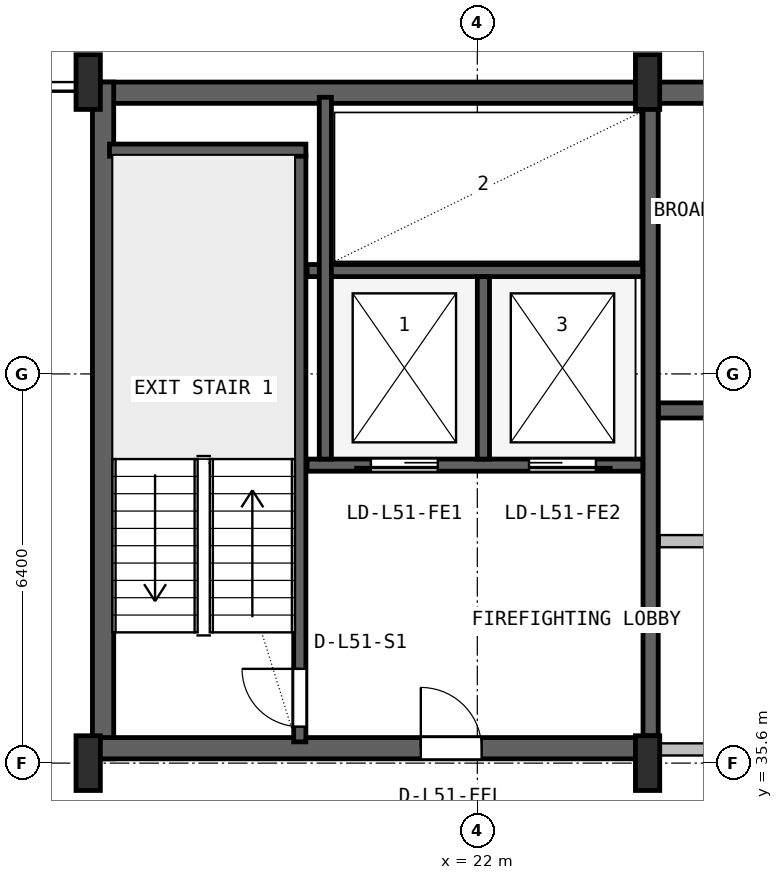
"""IFC4 building model, lengths in metres.
Left out: names, types, materials, properties, quantities, classifications, styles, units other than length and angle.
Written with IfcOpenShell. Run it as: python <this file> out.ifc"""

import sys

from ifc_helpers import new_model, si_unit, direction, frame, frame_2d, origin, origin_2d, place, context, subcontext, project, spatial, rectangle, i_section, extrude, source, transform, mapped, element, fill, save


model = new_model("IFC4")
c1 = context("Model", 3, precision=1e-05, world=origin(), true_north=direction((0.0, 1.0)))
c2 = subcontext(c1, "Body", "Model", "MODEL_VIEW")
j1 = project(units=[si_unit("LENGTHUNIT", "METRE"), si_unit("PLANEANGLEUNIT", "RADIAN")], contexts=[c1])
p1 = place(None, origin())
s1 = spatial("IfcSite", under=j1, at=p1, CompositionType="ELEMENT")
p2 = place(p1, origin())
s2 = spatial("IfcBuilding", under=s1, at=p2, CompositionType="ELEMENT")
p3 = place(p2, frame((0.0, 0.0, 207.4)))
s3 = spatial("IfcBuildingStorey", under=s2, at=p3, CompositionType="ELEMENT", Elevation=207.4)
p4 = place(p3, frame((15.6, 46.625, 0.0), z_axis=(0.0, 0.0, 1.0), x_axis=(1.0, 0.0, 0.0)))
e1 = element("IfcWall", 1, at=p4, inside=s3, PredefinedType="SHEAR", context=c2, shape_type="SweptSolid", body=[
    extrude(rectangle(XDim=36.8, YDim=0.35, at=frame_2d((18.4, 0.0))), origin(), (0.0, 0.0, 1.0), 3.55),
])
p5 = place(p3, frame((15.845, 35.67, 0.0), z_axis=(0.0, 0.0, 1.0), x_axis=(0.0, 1.0, 0.0)))
e2 = element("IfcWall", 2, at=p5, inside=s3, PredefinedType="SHEAR", context=c2, shape_type="SweptSolid", body=[
    extrude(rectangle(XDim=11.13, YDim=0.35, at=frame_2d((5.565, 0.0))), origin(), (0.0, 0.0, 1.0), 3.55),
])
p6 = place(p3, frame((15.67, 35.845, 0.0), z_axis=(0.0, 0.0, 1.0), x_axis=(1.0, 0.0, 0.0)))
e3 = element("IfcWall", 3, at=p6, inside=s3, PredefinedType="SHEAR", context=c2, shape_type="SweptSolid", body=[
    extrude(rectangle(XDim=9.13, YDim=0.35, at=frame_2d((4.565, 0.0))), origin(), (0.0, 0.0, 1.0), 3.55),
])
p7 = place(p6, frame((5.4, 0.0, 0.0)))
e4 = element("IfcOpeningElement", 4, at=p7, cuts=e3, PredefinedType="OPENING", context=c2, shape_type="SweptSolid", body=[
    extrude(rectangle(XDim=1.0, YDim=2.1, at=frame_2d((0.5, 1.05))), frame((0.0, 0.185, 0.0), z_axis=(0.0, -1.0, 0.0), x_axis=(1.0, 0.0, 0.0)), (0.0, 0.0, 1.0), 0.37),
])
m1 = source(origin(), c2, "Body", "SweptSolid", [
    extrude(i_section(OverallWidth=0.4, OverallDepth=0.9, WebThickness=0.016, FlangeThickness=0.028, FilletRadius=0.016, at=origin_2d()), origin(), (0.0, 0.0, 1.0), 3.8),
])
for number, where, z_axis, x_axis in (
    (5, (15.6, 35.6, 0.0), (0.0, 0.0, 1.0), (1.0, 0.0, 0.0)),
    (6, (15.6, 46.8, 0.0), (0.0, 0.0, 1.0), (1.0, 0.0, 0.0)),
    (7, (24.8, 35.6, 0.0), (0.0, 0.0, 1.0), (1.0, 0.0, 0.0)),
    (8, (24.8, 46.8, 0.0), (0.0, 0.0, 1.0), (1.0, 0.0, 0.0)),
):
    element("IfcColumn", number, at=place(p3, frame(where, z_axis=z_axis, x_axis=x_axis)), inside=s3, PredefinedType="COLUMN", context=c2, shape_type="MappedRepresentation", body=[
        mapped(m1, transform((0.0, 0.0, 0.0), x_axis=(1.0, 0.0, 0.0), y_axis=(0.0, 1.0, 0.0), z_axis=(0.0, 0.0, 1.0), scale=1.0)),
    ])
p8 = place(p3, frame((19.08, 35.95, 0.0), z_axis=(0.0, 0.0, 1.0), x_axis=(0.0, 1.0, 0.0)))
e9 = element("IfcWall", 9, at=p8, inside=s3, PredefinedType="SHEAR", context=c2, shape_type="SweptSolid", body=[
    extrude(rectangle(XDim=9.65, YDim=0.2, at=frame_2d((4.825, 0.0))), origin(), (0.0, 0.0, 1.0), 3.55),
])
p9 = place(p8, frame((0.25, 0.0, 0.0)))
e10 = element("IfcOpeningElement", 10, at=p9, cuts=e9, PredefinedType="OPENING", context=c2, shape_type="SweptSolid", body=[
    extrude(rectangle(XDim=0.95, YDim=2.1, at=frame_2d((0.475, 1.05))), frame((0.0, 0.11, 0.0), z_axis=(0.0, -1.0, 0.0), x_axis=(1.0, 0.0, 0.0)), (0.0, 0.0, 1.0), 0.22),
])
p10 = place(p3, frame((15.95, 45.68, 0.0), z_axis=(0.0, 0.0, 1.0), x_axis=(1.0, 0.0, 0.0)))
e11 = element("IfcWall", 11, at=p10, inside=s3, PredefinedType="SHEAR", context=c2, shape_type="SweptSolid", body=[
    extrude(rectangle(XDim=3.23, YDim=0.2, at=frame_2d((1.615, 0.0))), origin(), (0.0, 0.0, 1.0), 3.55),
])
p11 = place(p3, frame((24.85, 36.05, 0.0), z_axis=(0.0, 0.0, 1.0), x_axis=(0.0, 1.0, 0.0)))
e12 = element("IfcWall", 12, at=p11, inside=s3, PredefinedType="SHEAR", context=c2, shape_type="SweptSolid", body=[
    extrude(rectangle(XDim=10.45, YDim=0.25, at=frame_2d((5.225, 0.0))), origin(), (0.0, 0.0, 1.0), 3.55),
])
p12 = place(p3, frame((19.2, 40.5, 0.0), z_axis=(0.0, 0.0, 1.0), x_axis=(1.0, 0.0, 0.0)))
e13 = element("IfcWall", 13, at=p12, inside=s3, PredefinedType="SHEAR", context=c2, shape_type="SweptSolid", body=[
    extrude(rectangle(XDim=5.52, YDim=0.2, at=frame_2d((2.76, 0.0))), origin(), (0.0, 0.0, 1.0), 3.55),
])
p13 = place(p12, frame((1.05, 0.0, 0.0)))
e14 = element("IfcOpeningElement", 14, at=p13, cuts=e13, PredefinedType="OPENING", context=c2, shape_type="SweptSolid", body=[
    extrude(rectangle(XDim=1.1, YDim=2.18, at=frame_2d((0.55, 1.09))), frame((0.0, 0.11, 0.0), z_axis=(0.0, -1.0, 0.0), x_axis=(1.0, 0.0, 0.0)), (0.0, 0.0, 1.0), 0.22),
])
p14 = place(p12, frame((3.65, 0.0, 0.0)))
e15 = element("IfcOpeningElement", 15, at=p14, cuts=e13, PredefinedType="OPENING", context=c2, shape_type="SweptSolid", body=[
    extrude(rectangle(XDim=1.1, YDim=2.18, at=frame_2d((0.55, 1.09))), frame((0.0, 0.11, 0.0), z_axis=(0.0, -1.0, 0.0), x_axis=(1.0, 0.0, 0.0)), (0.0, 0.0, 1.0), 0.22),
])
p15 = place(p3, frame((19.2, 43.7, 0.0), z_axis=(0.0, 0.0, 1.0), x_axis=(1.0, 0.0, 0.0)))
e16 = element("IfcWall", 16, at=p15, inside=s3, PredefinedType="SHEAR", context=c2, shape_type="SweptSolid", body=[
    extrude(rectangle(XDim=5.52, YDim=0.2, at=frame_2d((2.76, 0.0))), origin(), (0.0, 0.0, 1.0), 3.55),
])
p16 = place(p3, frame((22.1, 40.6, 0.0), z_axis=(0.0, 0.0, 1.0), x_axis=(0.0, 1.0, 0.0)))
e17 = element("IfcWall", 17, at=p16, inside=s3, PredefinedType="SHEAR", context=c2, shape_type="SweptSolid", body=[
    extrude(rectangle(XDim=3.0, YDim=0.2, at=frame_2d((1.5, 0.0))), origin(), (0.0, 0.0, 1.0), 3.55),
])
p17 = place(p3, frame((19.5, 40.6, 0.0), z_axis=(0.0, 0.0, 1.0), x_axis=(0.0, 1.0, 0.0)))
e18 = element("IfcWall", 18, at=p17, inside=s3, PredefinedType="SHEAR", context=c2, shape_type="SweptSolid", body=[
    extrude(rectangle(XDim=5.95, YDim=0.2, at=frame_2d((2.975, 0.0))), origin(), (0.0, 0.0, 1.0), 3.55),
])
p18 = place(p3, frame((24.98, 41.4, 0.0), z_axis=(0.0, 0.0, 1.0), x_axis=(1.0, 0.0, 0.0)))
e19 = element("IfcWall", 19, at=p18, inside=s3, PredefinedType="SHEAR", context=c2, shape_type="SweptSolid", body=[
    extrude(rectangle(XDim=23.82, YDim=0.25, at=frame_2d((11.91, 0.0))), origin(), (0.0, 0.0, 1.0), 3.55),
])
p19 = place(p18, frame((16.87, 0.0, 0.0)))
e20 = element("IfcOpeningElement", 20, at=p19, cuts=e19, PredefinedType="OPENING", context=c2, shape_type="SweptSolid", body=[
    extrude(rectangle(XDim=1.1, YDim=2.18, at=frame_2d((0.55, 1.09))), frame((0.0, 0.135, 0.0), z_axis=(0.0, -1.0, 0.0), x_axis=(1.0, 0.0, 0.0)), (0.0, 0.0, 1.0), 0.27),
])
p20 = place(p18, frame((19.47, 0.0, 0.0)))
e21 = element("IfcOpeningElement", 21, at=p20, cuts=e19, PredefinedType="OPENING", context=c2, shape_type="SweptSolid", body=[
    extrude(rectangle(XDim=1.1, YDim=2.18, at=frame_2d((0.55, 1.09))), frame((0.0, 0.135, 0.0), z_axis=(0.0, -1.0, 0.0), x_axis=(1.0, 0.0, 0.0)), (0.0, 0.0, 1.0), 0.27),
])
p21 = place(p18, frame((22.07, 0.0, 0.0)))
e22 = element("IfcOpeningElement", 22, at=p21, cuts=e19, PredefinedType="OPENING", context=c2, shape_type="SweptSolid", body=[
    extrude(rectangle(XDim=1.1, YDim=2.18, at=frame_2d((0.55, 1.09))), frame((0.0, 0.135, 0.0), z_axis=(0.0, -1.0, 0.0), x_axis=(1.0, 0.0, 0.0)), (0.0, 0.0, 1.0), 0.27),
])
p22 = place(p18, frame((3.56, 0.0, 0.0)))
e23 = element("IfcOpeningElement", 23, at=p22, cuts=e19, PredefinedType="OPENING", context=c2, shape_type="SweptSolid", body=[
    extrude(rectangle(XDim=1.0, YDim=2.08, at=frame_2d((0.5, 1.04))), frame((0.0, 0.135, 0.0), z_axis=(0.0, -1.0, 0.0), x_axis=(1.0, 0.0, 0.0)), (0.0, 0.0, 1.0), 0.27),
])
p23 = place(p18, frame((9.76, 0.0, 0.0)))
e24 = element("IfcOpeningElement", 24, at=p23, cuts=e19, PredefinedType="OPENING", context=c2, shape_type="SweptSolid", body=[
    extrude(rectangle(XDim=0.92, YDim=2.08, at=frame_2d((0.46, 1.04))), frame((0.0, 0.135, 0.0), z_axis=(0.0, -1.0, 0.0), x_axis=(1.0, 0.0, 0.0)), (0.0, 0.0, 1.0), 0.27),
])
p24 = place(p18, frame((13.66, 0.0, 0.0)))
e25 = element("IfcOpeningElement", 25, at=p24, cuts=e19, PredefinedType="OPENING", context=c2, shape_type="SweptSolid", body=[
    extrude(rectangle(XDim=0.92, YDim=2.08, at=frame_2d((0.46, 1.04))), frame((0.0, 0.135, 0.0), z_axis=(0.0, -1.0, 0.0), x_axis=(1.0, 0.0, 0.0)), (0.0, 0.0, 1.0), 0.27),
])
p25 = place(p3, frame((25.0, 35.825, 0.0), z_axis=(0.0, 0.0, 1.0), x_axis=(1.0, 0.0, 0.0)))
e26 = element("IfcWall", 26, at=p25, inside=s3, PredefinedType="PLUMBINGWALL", context=c2, shape_type="SweptSolid", body=[
    extrude(rectangle(XDim=9.75, YDim=0.2, at=frame_2d((4.875, 0.0))), origin(), (0.0, 0.0, 1.0), 2.575),
])
p26 = place(p3, frame((25.0, 39.25, 0.0), z_axis=(0.0, 0.0, 1.0), x_axis=(1.0, 0.0, 0.0)))
e27 = element("IfcWall", 27, at=p26, inside=s3, PredefinedType="PLUMBINGWALL", context=c2, shape_type="SweptSolid", body=[
    extrude(rectangle(XDim=9.75, YDim=0.2, at=frame_2d((4.875, 0.0))), origin(), (0.0, 0.0, 1.0), 3.53),
])
p27 = place(p26, frame((1.75, 0.0, 0.0)))
e28 = element("IfcOpeningElement", 28, at=p27, cuts=e27, PredefinedType="OPENING", context=c2, shape_type="SweptSolid", body=[
    extrude(rectangle(XDim=0.9, YDim=2.06, at=frame_2d((0.45, 1.03))), frame((0.0, 0.11, 0.0), z_axis=(0.0, -1.0, 0.0), x_axis=(1.0, 0.0, 0.0)), (0.0, 0.0, 1.0), 0.22),
])
p28 = place(p26, frame((6.725, 0.0, 0.0)))
e29 = element("IfcOpeningElement", 29, at=p28, cuts=e27, PredefinedType="OPENING", context=c2, shape_type="SweptSolid", body=[
    extrude(rectangle(XDim=0.9, YDim=2.06, at=frame_2d((0.45, 1.03))), frame((0.0, 0.11, 0.0), z_axis=(0.0, -1.0, 0.0), x_axis=(1.0, 0.0, 0.0)), (0.0, 0.0, 1.0), 0.22),
])
m2 = source(origin(), c2, "Body", "SweptSolid", [
    extrude(rectangle(XDim=0.95, YDim=2.1, at=frame_2d((0.475, 1.05))), frame((0.0, 0.025, 0.0), z_axis=(0.0, -1.0, 0.0), x_axis=(1.0, 0.0, 0.0)), (0.0, 0.0, 1.0), 0.05),
])
p29 = place(p9, origin())
e30 = element("IfcDoor", 30, at=p29, inside=s3, OperationType="SINGLE_SWING_RIGHT", PredefinedType="DOOR", context=c2, shape_type="MappedRepresentation", body=[
    mapped(m2, transform((0.0, 0.0, 0.0), x_axis=(1.0, 0.0, 0.0), y_axis=(0.0, 1.0, 0.0), z_axis=(0.0, 0.0, 1.0), scale=1.0)),
])
fill(e10, e30)
m3 = source(origin(), c2, "Body", "SweptSolid", [
    extrude(rectangle(XDim=1.0, YDim=2.1, at=frame_2d((0.5, 1.05))), frame((0.0, 0.025, 0.0), z_axis=(0.0, -1.0, 0.0), x_axis=(1.0, 0.0, 0.0)), (0.0, 0.0, 1.0), 0.05),
])
p30 = place(p7, origin())
e31 = element("IfcDoor", 31, at=p30, inside=s3, OperationType="SINGLE_SWING_LEFT", PredefinedType="DOOR", context=c2, shape_type="MappedRepresentation", body=[
    mapped(m3, transform((0.0, 0.0, 0.0), x_axis=(1.0, 0.0, 0.0), y_axis=(0.0, 1.0, 0.0), z_axis=(0.0, 0.0, 1.0), scale=1.0)),
])
fill(e4, e31)
m4 = source(origin(), c2, "Body", "SweptSolid", [
    extrude(rectangle(XDim=1.1, YDim=2.18, at=frame_2d((0.55, 1.09))), frame((0.0, 0.025, 0.0), z_axis=(0.0, -1.0, 0.0), x_axis=(1.0, 0.0, 0.0)), (0.0, 0.0, 1.0), 0.05),
])
p31 = place(p13, frame((1.1, 0.0, 0.0), z_axis=(0.0, 0.0, 1.0), x_axis=(-1.0, 0.0, 0.0)))
e32 = element("IfcDoor", 32, at=p31, inside=s3, OperationType="SLIDING_TO_LEFT", PredefinedType="DOOR", context=c2, shape_type="MappedRepresentation", body=[
    mapped(m4, transform((0.0, 0.0, 0.0), x_axis=(1.0, 0.0, 0.0), y_axis=(0.0, 1.0, 0.0), z_axis=(0.0, 0.0, 1.0), scale=1.0)),
])
fill(e14, e32)
p32 = place(p14, frame((1.1, 0.0, 0.0), z_axis=(0.0, 0.0, 1.0), x_axis=(-1.0, 0.0, 0.0)))
e33 = element("IfcDoor", 33, at=p32, inside=s3, OperationType="SLIDING_TO_RIGHT", PredefinedType="DOOR", context=c2, shape_type="MappedRepresentation", body=[
    mapped(m4, transform((0.0, 0.0, 0.0), x_axis=(1.0, 0.0, 0.0), y_axis=(0.0, 1.0, 0.0), z_axis=(0.0, 0.0, 1.0), scale=1.0)),
])
fill(e15, e33)
save(model, sys.argv[1])
